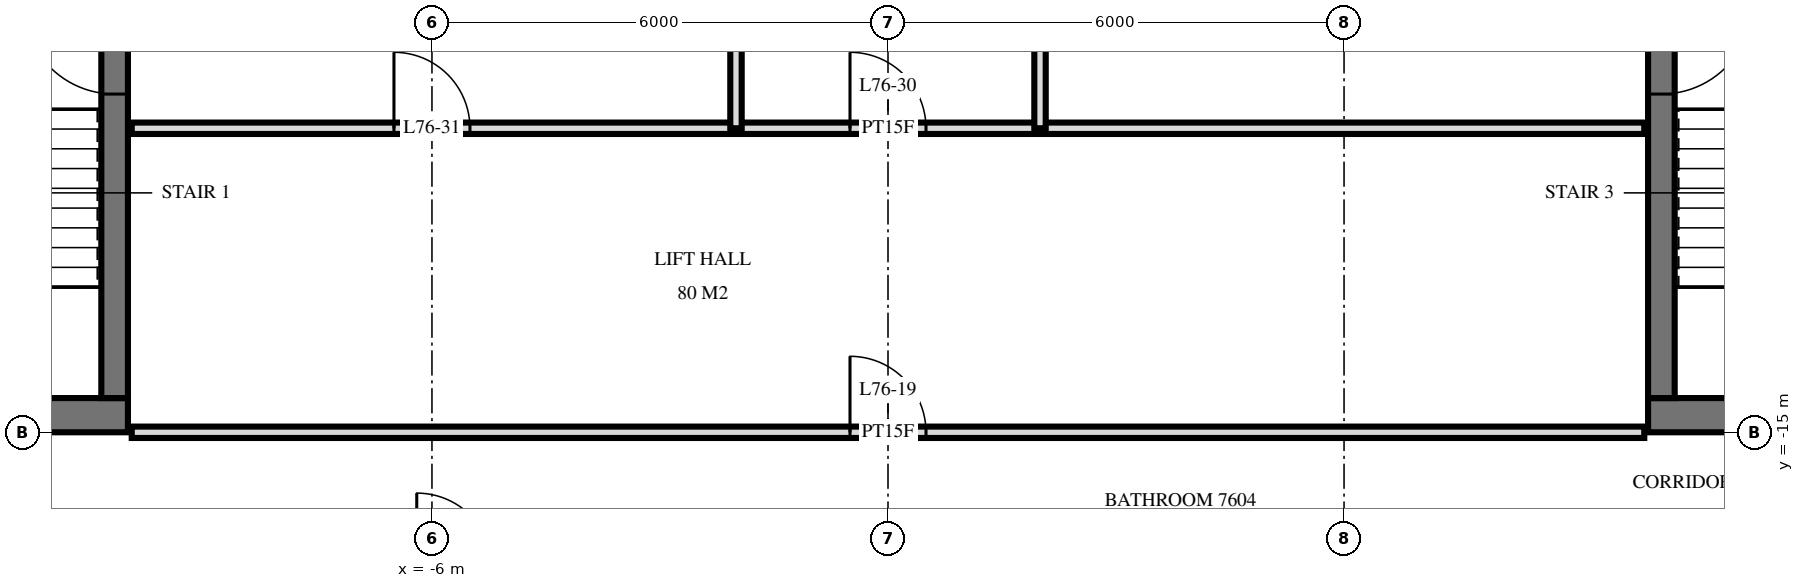
"""IFC4 building model, lengths in metres.
Left out: names, types, materials, properties, quantities, classifications, styles, units other than length and angle.
Written with IfcOpenShell. Run it as: python <this file> out.ifc"""

import sys

from ifc_helpers import new_model, si_unit, direction, frame, frame_2d, origin, place, context, subcontext, project, spatial, rectangle, extrude, element, fill, save


model = new_model("IFC4")
c1 = context("Model", 3, precision=1e-05, world=origin(), true_north=direction((0.0, 1.0)))
c2 = subcontext(c1, "Body", "Model", "MODEL_VIEW")
j1 = project(units=[si_unit("LENGTHUNIT", "METRE"), si_unit("PLANEANGLEUNIT", "RADIAN")], contexts=[c1])
p1 = place(None, origin())
s1 = spatial("IfcSite", under=j1, at=p1, CompositionType="ELEMENT")
p2 = place(p1, origin())
s2 = spatial("IfcBuilding", under=s1, at=p2, CompositionType="ELEMENT")
p3 = place(p2, frame((0.0, 0.0, 287.6)))
s3 = spatial("IfcBuildingStorey", under=s2, at=p3, CompositionType="ELEMENT", Elevation=287.6)
p4 = place(p3, frame((-19.5, -14.775, 0.0), z_axis=(0.0, 0.0, 1.0), x_axis=(1.0, 0.0, 0.0)))
e1 = element("IfcWall", 1, at=p4, inside=s3, PredefinedType="SHEAR", context=c2, shape_type="SweptSolid", body=[
    extrude(rectangle(XDim=9.5, YDim=0.45, at=frame_2d((4.75, 0.0))), origin(), (0.0, 0.0, 1.0), 3.5),
])
p5 = place(p4, frame((1.2, 0.0, 0.0)))
e2 = element("IfcOpeningElement", 2, at=p5, cuts=e1, PredefinedType="OPENING", context=c2, shape_type="SweptSolid", body=[
    extrude(rectangle(XDim=1.2, YDim=2.1, at=frame_2d((0.6, 1.05))), frame((0.0, 0.235, 0.0), z_axis=(0.0, -1.0, 0.0), x_axis=(1.0, 0.0, 0.0)), (0.0, 0.0, 1.0), 0.47),
])
p6 = place(p4, frame((4.25, 0.0, 0.0)))
e3 = element("IfcOpeningElement", 3, at=p6, cuts=e1, PredefinedType="OPENING", context=c2, shape_type="SweptSolid", body=[
    extrude(rectangle(XDim=1.1, YDim=2.1, at=frame_2d((0.55, 1.05))), frame((0.0, 0.235, 0.0), z_axis=(0.0, -1.0, 0.0), x_axis=(1.0, 0.0, 0.0)), (0.0, 0.0, 1.0), 0.47),
])
p7 = place(p3, frame((-10.175, -14.55, 0.0), z_axis=(0.0, 0.0, 1.0), x_axis=(0.0, 1.0, 0.0)))
e4 = element("IfcWall", 4, at=p7, inside=s3, PredefinedType="SHEAR", context=c2, shape_type="SweptSolid", body=[
    extrude(rectangle(XDim=14.1, YDim=0.35, at=frame_2d((7.05, 0.0))), origin(), (0.0, 0.0, 1.0), 3.5),
])
p8 = place(p7, frame((8.4, 0.0, 0.0)))
e5 = element("IfcOpeningElement", 5, at=p8, cuts=e4, PredefinedType="OPENING", context=c2, shape_type="SweptSolid", body=[
    extrude(rectangle(XDim=1.4, YDim=2.4, at=frame_2d((0.7, 1.2))), frame((0.0, 0.185, 0.0), z_axis=(0.0, -1.0, 0.0), x_axis=(1.0, 0.0, 0.0)), (0.0, 0.0, 1.0), 0.37),
])
p9 = place(p7, frame((10.0, 0.0, 0.0)))
e6 = element("IfcOpeningElement", 6, at=p9, cuts=e4, PredefinedType="OPENING", context=c2, shape_type="SweptSolid", body=[
    extrude(rectangle(XDim=1.4, YDim=2.4, at=frame_2d((0.7, 1.2))), frame((0.0, 0.185, 0.0), z_axis=(0.0, -1.0, 0.0), x_axis=(1.0, 0.0, 0.0)), (0.0, 0.0, 1.0), 0.37),
])
p10 = place(p7, frame((4.0, 0.0, 0.0)))
e7 = element("IfcOpeningElement", 7, at=p10, cuts=e4, PredefinedType="OPENING", context=c2, shape_type="SweptSolid", body=[
    extrude(rectangle(XDim=1.2, YDim=2.1, at=frame_2d((0.6, 1.05))), frame((0.0, 0.185, 0.0), z_axis=(0.0, -1.0, 0.0), x_axis=(1.0, 0.0, 0.0)), (0.0, 0.0, 1.0), 0.37),
])
p11 = place(p3, frame((10.0, -14.775, 0.0), z_axis=(0.0, 0.0, 1.0), x_axis=(1.0, 0.0, 0.0)))
e8 = element("IfcWall", 8, at=p11, inside=s3, PredefinedType="SHEAR", context=c2, shape_type="SweptSolid", body=[
    extrude(rectangle(XDim=9.5, YDim=0.45, at=frame_2d((4.75, 0.0))), origin(), (0.0, 0.0, 1.0), 3.5),
])
p12 = place(p11, frame((7.1, 0.0, 0.0)))
e9 = element("IfcOpeningElement", 9, at=p12, cuts=e8, PredefinedType="OPENING", context=c2, shape_type="SweptSolid", body=[
    extrude(rectangle(XDim=1.2, YDim=2.1, at=frame_2d((0.6, 1.05))), frame((0.0, 0.235, 0.0), z_axis=(0.0, -1.0, 0.0), x_axis=(1.0, 0.0, 0.0)), (0.0, 0.0, 1.0), 0.47),
])
p13 = place(p11, frame((4.15, 0.0, 0.0)))
e10 = element("IfcOpeningElement", 10, at=p13, cuts=e8, PredefinedType="OPENING", context=c2, shape_type="SweptSolid", body=[
    extrude(rectangle(XDim=1.1, YDim=2.1, at=frame_2d((0.55, 1.05))), frame((0.0, 0.235, 0.0), z_axis=(0.0, -1.0, 0.0), x_axis=(1.0, 0.0, 0.0)), (0.0, 0.0, 1.0), 0.47),
])
p14 = place(p3, frame((10.175, -14.55, 0.0), z_axis=(0.0, 0.0, 1.0), x_axis=(0.0, 1.0, 0.0)))
e11 = element("IfcWall", 11, at=p14, inside=s3, PredefinedType="SHEAR", context=c2, shape_type="SweptSolid", body=[
    extrude(rectangle(XDim=14.1, YDim=0.35, at=frame_2d((7.05, 0.0))), origin(), (0.0, 0.0, 1.0), 3.5),
])
p15 = place(p14, frame((8.4, 0.0, 0.0)))
e12 = element("IfcOpeningElement", 12, at=p15, cuts=e11, PredefinedType="OPENING", context=c2, shape_type="SweptSolid", body=[
    extrude(rectangle(XDim=1.4, YDim=2.4, at=frame_2d((0.7, 1.2))), frame((0.0, 0.185, 0.0), z_axis=(0.0, -1.0, 0.0), x_axis=(1.0, 0.0, 0.0)), (0.0, 0.0, 1.0), 0.37),
])
p16 = place(p14, frame((10.0, 0.0, 0.0)))
e13 = element("IfcOpeningElement", 13, at=p16, cuts=e11, PredefinedType="OPENING", context=c2, shape_type="SweptSolid", body=[
    extrude(rectangle(XDim=1.4, YDim=2.4, at=frame_2d((0.7, 1.2))), frame((0.0, 0.185, 0.0), z_axis=(0.0, -1.0, 0.0), x_axis=(1.0, 0.0, 0.0)), (0.0, 0.0, 1.0), 0.37),
])
p17 = place(p14, frame((4.0, 0.0, 0.0)))
e14 = element("IfcOpeningElement", 14, at=p17, cuts=e11, PredefinedType="OPENING", context=c2, shape_type="SweptSolid", body=[
    extrude(rectangle(XDim=1.2, YDim=2.1, at=frame_2d((0.6, 1.05))), frame((0.0, 0.185, 0.0), z_axis=(0.0, -1.0, 0.0), x_axis=(1.0, 0.0, 0.0)), (0.0, 0.0, 1.0), 0.37),
])
for number, where, z_axis, x_axis in (
    (15, (2.0, -11.0, 0.0), (0.0, 0.0, 1.0), (0.0, 1.0, 0.0)),
    (16, (-2.0, -11.0, 0.0), (0.0, 0.0, 1.0), (0.0, 1.0, 0.0)),
):
    element("IfcWall", number, at=place(p3, frame(where, z_axis=z_axis, x_axis=x_axis)), inside=s3, PredefinedType="PARTITIONING", context=c2, shape_type="SweptSolid", body=[
        extrude(rectangle(XDim=4.0, YDim=0.15, at=frame_2d((2.0, 0.0))), origin(), (0.0, 0.0, 1.0), 3.22),
    ])
p18 = place(p3, frame((-9.95, -15.0, 0.0), z_axis=(0.0, 0.0, 1.0), x_axis=(1.0, 0.0, 0.0)))
e17 = element("IfcWall", 17, at=p18, inside=s3, PredefinedType="PARTITIONING", context=c2, shape_type="SweptSolid", body=[
    extrude(rectangle(XDim=19.9, YDim=0.15, at=frame_2d((9.95, 0.0))), origin(), (0.0, 0.0, 1.0), 2.584),
])
p19 = place(p18, frame((9.45, 0.0, 0.0)))
e18 = element("IfcOpeningElement", 18, at=p19, cuts=e17, PredefinedType="OPENING", context=c2, shape_type="SweptSolid", body=[
    extrude(rectangle(XDim=1.0, YDim=2.1, at=frame_2d((0.5, 1.05))), frame((0.0, 0.085, 0.0), z_axis=(0.0, -1.0, 0.0), x_axis=(1.0, 0.0, 0.0)), (0.0, 0.0, 1.0), 0.17),
])
p20 = place(p3, frame((-9.95, -11.0, 0.0), z_axis=(0.0, 0.0, 1.0), x_axis=(1.0, 0.0, 0.0)))
e19 = element("IfcWall", 19, at=p20, inside=s3, PredefinedType="PARTITIONING", context=c2, shape_type="SweptSolid", body=[
    extrude(rectangle(XDim=19.9, YDim=0.15, at=frame_2d((9.95, 0.0))), origin(), (0.0, 0.0, 1.0), 3.22),
])
p21 = place(p20, frame((9.45, 0.0, 0.0)))
e20 = element("IfcOpeningElement", 20, at=p21, cuts=e19, PredefinedType="OPENING", context=c2, shape_type="SweptSolid", body=[
    extrude(rectangle(XDim=1.0, YDim=2.1, at=frame_2d((0.5, 1.05))), frame((0.0, 0.085, 0.0), z_axis=(0.0, -1.0, 0.0), x_axis=(1.0, 0.0, 0.0)), (0.0, 0.0, 1.0), 0.17),
])
p22 = place(p20, frame((3.45, 0.0, 0.0)))
e21 = element("IfcOpeningElement", 21, at=p22, cuts=e19, PredefinedType="OPENING", context=c2, shape_type="SweptSolid", body=[
    extrude(rectangle(XDim=1.0, YDim=2.1, at=frame_2d((0.5, 1.05))), frame((0.0, 0.085, 0.0), z_axis=(0.0, -1.0, 0.0), x_axis=(1.0, 0.0, 0.0)), (0.0, 0.0, 1.0), 0.17),
])
p23 = place(p10, origin())
e22 = element("IfcDoor", 22, at=p23, inside=s3, OperationType="SINGLE_SWING_LEFT", PredefinedType="DOOR", context=c2, shape_type="SweptSolid", body=[
    extrude(rectangle(XDim=1.2, YDim=2.1, at=frame_2d((0.6, 1.05))), frame((0.0, 0.025, 0.0), z_axis=(0.0, -1.0, 0.0), x_axis=(1.0, 0.0, 0.0)), (0.0, 0.0, 1.0), 0.05),
])
fill(e7, e22)
p24 = place(p17, frame((0.6, 0.0, 0.0), z_axis=(0.0, 0.0, 1.0), x_axis=(-1.0, 0.0, 0.0)))
e23 = element("IfcDoor", 23, at=p24, inside=s3, OperationType="SINGLE_SWING_RIGHT", PredefinedType="DOOR", context=c2, shape_type="SweptSolid", body=[
    extrude(rectangle(XDim=1.2, YDim=2.1, at=frame_2d((0.0, 1.05))), frame((0.0, -0.025, 0.0), z_axis=(0.0, 1.0, 0.0), x_axis=(-1.0, 0.0, 0.0)), (0.0, 0.0, 1.0), 0.05),
])
fill(e14, e23)
p25 = place(p19, origin())
e24 = element("IfcDoor", 24, at=p25, inside=s3, OperationType="SINGLE_SWING_RIGHT", PredefinedType="DOOR", context=c2, shape_type="SweptSolid", body=[
    extrude(rectangle(XDim=1.0, YDim=2.1, at=frame_2d((0.5, 1.05))), frame((0.0, 0.025, 0.0), z_axis=(0.0, -1.0, 0.0), x_axis=(1.0, 0.0, 0.0)), (0.0, 0.0, 1.0), 0.05),
])
fill(e18, e24)
p26 = place(p21, origin())
e25 = element("IfcDoor", 25, at=p26, inside=s3, OperationType="SINGLE_SWING_RIGHT", PredefinedType="DOOR", context=c2, shape_type="SweptSolid", body=[
    extrude(rectangle(XDim=1.0, YDim=2.1, at=frame_2d((0.5, 1.05))), frame((0.0, 0.025, 0.0), z_axis=(0.0, -1.0, 0.0), x_axis=(1.0, 0.0, 0.0)), (0.0, 0.0, 1.0), 0.05),
])
fill(e20, e25)
p27 = place(p22, origin())
e26 = element("IfcDoor", 26, at=p27, inside=s3, OperationType="SINGLE_SWING_RIGHT", PredefinedType="DOOR", context=c2, shape_type="SweptSolid", body=[
    extrude(rectangle(XDim=1.0, YDim=2.1, at=frame_2d((0.5, 1.05))), frame((0.0, 0.025, 0.0), z_axis=(0.0, -1.0, 0.0), x_axis=(1.0, 0.0, 0.0)), (0.0, 0.0, 1.0), 0.05),
])
fill(e21, e26)
save(model, sys.argv[1])
